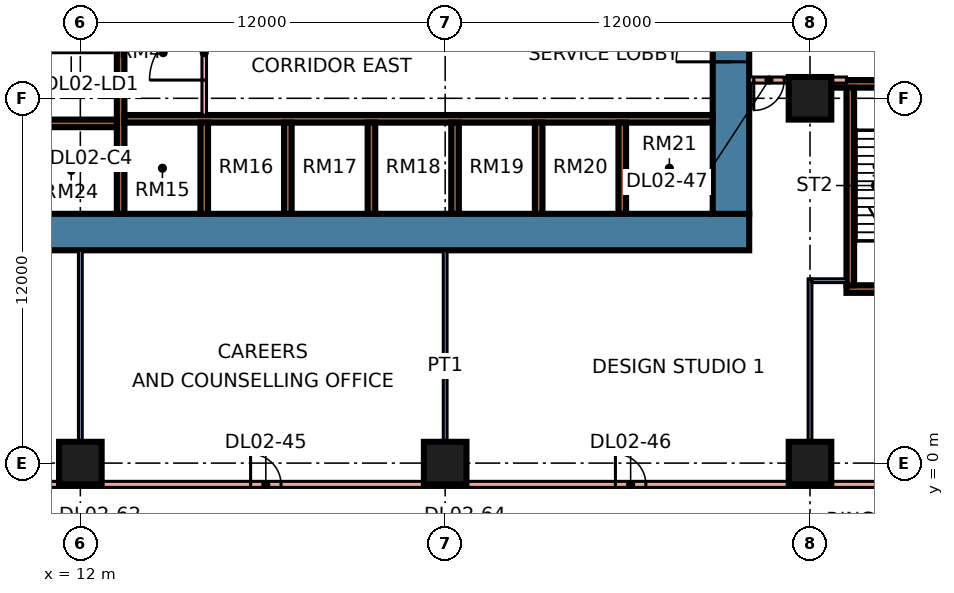
"""IFC4 building model, lengths in metres.
Left out: names, types, materials, properties, quantities, classifications, styles, units other than length and angle.
Written with IfcOpenShell. Run it as: python <this file> out.ifc"""

import sys

from ifc_helpers import new_model, si_unit, direction, frame, frame_2d, origin, origin_2d, place, context, subcontext, project, spatial, rectangle, extrude, element, fill, save


model = new_model("IFC4")
c1 = context("Model", 3, precision=1e-05, world=origin(), true_north=direction((0.0, 1.0)))
c2 = subcontext(c1, "Body", "Model", "MODEL_VIEW")
j1 = project(units=[si_unit("LENGTHUNIT", "METRE"), si_unit("PLANEANGLEUNIT", "RADIAN")], contexts=[c1])
p1 = place(None, origin())
s1 = spatial("IfcSite", under=j1, at=p1, CompositionType="ELEMENT")
p2 = place(p1, origin())
s2 = spatial("IfcBuilding", under=s1, at=p2, CompositionType="ELEMENT")
p3 = place(p2, frame((0.0, 0.0, 12.0)))
s3 = spatial("IfcBuildingStorey", under=s2, at=p3, CompositionType="ELEMENT", Elevation=12.0)
for number, where, z_axis, x_axis in (
    (1, (12.0, 0.0, 0.0), (0.0, 0.0, 1.0), (1.0, 0.0, 0.0)),
    (2, (24.0, 0.0, 0.0), (0.0, 0.0, 1.0), (1.0, 0.0, 0.0)),
    (3, (36.0, 0.0, 0.0), (0.0, 0.0, 1.0), (1.0, 0.0, 0.0)),
    (4, (36.0, 12.0, 0.0), (0.0, 0.0, 1.0), (1.0, 0.0, 0.0)),
):
    element("IfcColumn", number, at=place(p3, frame(where, z_axis=z_axis, x_axis=x_axis)), inside=s3, PredefinedType="COLUMN", context=c2, shape_type="SweptSolid", body=[
        extrude(rectangle(XDim=1.4, YDim=1.4, at=origin_2d()), origin(), (0.0, 0.0, 1.0), 4.8),
    ])
p4 = place(p3, frame((9.0, 7.6, 0.0), z_axis=(0.0, 0.0, 1.0), x_axis=(1.0, 0.0, 0.0)))
e5 = element("IfcWall", 5, at=p4, inside=s3, PredefinedType="SHEAR", context=c2, shape_type="SweptSolid", body=[
    extrude(rectangle(XDim=25.0, YDim=1.2, at=frame_2d((12.5, 0.0))), origin(), (0.0, 0.0, 1.0), 4.8),
])
p5 = place(p3, frame((33.4, 8.2, 0.0), z_axis=(0.0, 0.0, 1.0), x_axis=(0.0, 1.0, 0.0)))
e6 = element("IfcWall", 6, at=p5, inside=s3, PredefinedType="SHEAR", context=c2, shape_type="SweptSolid", body=[
    extrude(rectangle(XDim=10.6, YDim=1.2, at=frame_2d((5.3, 0.0))), origin(), (0.0, 0.0, 1.0), 4.8),
])
p6 = place(p5, frame((5.0, 0.0, 0.0)))
e7 = element("IfcOpeningElement", 7, at=p6, cuts=e6, PredefinedType="OPENING", context=c2, shape_type="SweptSolid", body=[
    extrude(rectangle(XDim=1.8, YDim=2.4, at=frame_2d((0.9, 1.2))), frame((0.0, 0.61, 0.0), z_axis=(0.0, -1.0, 0.0), x_axis=(1.0, 0.0, 0.0)), (0.0, 0.0, 1.0), 1.22),
])
p7 = place(p3, frame((13.325, 8.2, 0.0), z_axis=(0.0, 0.0, 1.0), x_axis=(0.0, 1.0, 0.0)))
e8 = element("IfcWall", 8, at=p7, inside=s3, PredefinedType="SHEAR", context=c2, shape_type="SweptSolid", body=[
    extrude(rectangle(XDim=10.6, YDim=0.25, at=frame_2d((5.3, 0.0))), origin(), (0.0, 0.0, 1.0), 4.8),
])
p8 = place(p3, frame((13.45, 11.325, 0.0), z_axis=(0.0, 0.0, 1.0), x_axis=(1.0, 0.0, 0.0)))
e9 = element("IfcWall", 9, at=p8, inside=s3, PredefinedType="SHEAR", context=c2, shape_type="SweptSolid", body=[
    extrude(rectangle(XDim=19.35, YDim=0.25, at=frame_2d((9.675, 0.0))), origin(), (0.0, 0.0, 1.0), 4.8),
])
for number, where, z_axis, x_axis in (
    (10, (10.2, 11.175, 0.0), (0.0, 0.0, 1.0), (1.0, 0.0, 0.0)),
    (11, (16.075, 8.2, 0.0), (0.0, 0.0, 1.0), (0.0, 1.0, 0.0)),
    (12, (18.825, 8.2, 0.0), (0.0, 0.0, 1.0), (0.0, 1.0, 0.0)),
    (13, (21.575, 8.2, 0.0), (0.0, 0.0, 1.0), (0.0, 1.0, 0.0)),
    (14, (24.325, 8.2, 0.0), (0.0, 0.0, 1.0), (0.0, 1.0, 0.0)),
    (15, (27.075, 8.2, 0.0), (0.0, 0.0, 1.0), (0.0, 1.0, 0.0)),
    (16, (29.825, 8.2, 0.0), (0.0, 0.0, 1.0), (0.0, 1.0, 0.0)),
):
    element("IfcWall", number, at=place(p3, frame(where, z_axis=z_axis, x_axis=x_axis)), inside=s3, PredefinedType="SHEAR", context=c2, shape_type="SweptSolid", body=[
        extrude(rectangle(XDim=3.0, YDim=0.25, at=frame_2d((1.5, 0.0))), origin(), (0.0, 0.0, 1.0), 4.8),
    ])
p9 = place(p3, frame((37.2, 5.725, 0.0), z_axis=(0.0, 0.0, 1.0), x_axis=(1.0, 0.0, 0.0)))
e17 = element("IfcWall", 17, at=p9, inside=s3, PredefinedType="SHEAR", context=c2, shape_type="SweptSolid", body=[
    extrude(rectangle(XDim=3.45, YDim=0.25, at=frame_2d((1.725, 0.0))), origin(), (0.0, 0.0, 1.0), 4.8),
])
p10 = place(p3, frame((36.7, 12.475, 0.0), z_axis=(0.0, 0.0, 1.0), x_axis=(1.0, 0.0, 0.0)))
e18 = element("IfcWall", 18, at=p10, inside=s3, PredefinedType="SHEAR", context=c2, shape_type="SweptSolid", body=[
    extrude(rectangle(XDim=3.95, YDim=0.25, at=frame_2d((1.975, 0.0))), origin(), (0.0, 0.0, 1.0), 4.8),
])
p11 = place(p10, frame((1.675, 0.0, 0.0)))
e19 = element("IfcOpeningElement", 19, at=p11, cuts=e18, PredefinedType="OPENING", context=c2, shape_type="SweptSolid", body=[
    extrude(rectangle(XDim=1.1, YDim=2.2, at=frame_2d((0.55, 1.1))), frame((0.0, 0.135, 0.0), z_axis=(0.0, -1.0, 0.0), x_axis=(1.0, 0.0, 0.0)), (0.0, 0.0, 1.0), 0.27),
])
p12 = place(p3, frame((37.325, 5.85, 0.0), z_axis=(0.0, 0.0, 1.0), x_axis=(0.0, 1.0, 0.0)))
e20 = element("IfcWall", 20, at=p12, inside=s3, PredefinedType="SHEAR", context=c2, shape_type="SweptSolid", body=[
    extrude(rectangle(XDim=6.5, YDim=0.25, at=frame_2d((3.25, 0.0))), origin(), (0.0, 0.0, 1.0), 4.8),
])
p13 = place(p3, frame((16.075, 11.45, 0.0), z_axis=(0.0, 0.0, 1.0), x_axis=(0.0, 1.0, 0.0)))
e21 = element("IfcWall", 21, at=p13, inside=s3, PredefinedType="PARTITIONING", context=c2, shape_type="SweptSolid", body=[
    extrude(rectangle(XDim=4.1, YDim=0.15, at=frame_2d((2.05, 0.0))), origin(), (0.0, 0.0, 1.0), 4.4),
])
p14 = place(p13, frame((1.15, 0.0, 0.0)))
e22 = element("IfcOpeningElement", 22, at=p14, cuts=e21, PredefinedType="OPENING", context=c2, shape_type="SweptSolid", body=[
    extrude(rectangle(XDim=1.8, YDim=2.4, at=frame_2d((0.9, 1.2))), frame((0.0, 0.085, 0.0), z_axis=(0.0, -1.0, 0.0), x_axis=(1.0, 0.0, 0.0)), (0.0, 0.0, 1.0), 0.17),
])
p15 = place(p3, frame((0.7, -0.7, 0.0), z_axis=(0.0, 0.0, 1.0), x_axis=(1.0, 0.0, 0.0)))
e23 = element("IfcWall", 23, at=p15, inside=s3, PredefinedType="PARTITIONING", context=c2, shape_type="SweptSolid", body=[
    extrude(rectangle(XDim=44.3, YDim=0.2, at=frame_2d((22.15, 0.0))), origin(), (0.0, 0.0, 1.0), 4.4),
])
p16 = place(p15, frame((39.4, 0.0, 0.0)))
e24 = element("IfcOpeningElement", 24, at=p16, cuts=e23, PredefinedType="OPENING", context=c2, shape_type="SweptSolid", body=[
    extrude(rectangle(XDim=1.0, YDim=2.1, at=frame_2d((0.5, 1.05))), frame((0.0, 0.11, 0.0), z_axis=(0.0, -1.0, 0.0), x_axis=(1.0, 0.0, 0.0)), (0.0, 0.0, 1.0), 0.22),
])
p17 = place(p15, frame((5.4, 0.0, 0.0)))
e25 = element("IfcOpeningElement", 25, at=p17, cuts=e23, PredefinedType="OPENING", context=c2, shape_type="SweptSolid", body=[
    extrude(rectangle(XDim=1.0, YDim=2.1, at=frame_2d((0.5, 1.05))), frame((0.0, 0.11, 0.0), z_axis=(0.0, -1.0, 0.0), x_axis=(1.0, 0.0, 0.0)), (0.0, 0.0, 1.0), 0.22),
])
p18 = place(p15, frame((16.9, 0.0, 0.0)))
e26 = element("IfcOpeningElement", 26, at=p18, cuts=e23, PredefinedType="OPENING", context=c2, shape_type="SweptSolid", body=[
    extrude(rectangle(XDim=1.0, YDim=2.1, at=frame_2d((0.5, 1.05))), frame((0.0, 0.11, 0.0), z_axis=(0.0, -1.0, 0.0), x_axis=(1.0, 0.0, 0.0)), (0.0, 0.0, 1.0), 0.22),
])
p19 = place(p15, frame((28.9, 0.0, 0.0)))
e27 = element("IfcOpeningElement", 27, at=p19, cuts=e23, PredefinedType="OPENING", context=c2, shape_type="SweptSolid", body=[
    extrude(rectangle(XDim=1.0, YDim=2.1, at=frame_2d((0.5, 1.05))), frame((0.0, 0.11, 0.0), z_axis=(0.0, -1.0, 0.0), x_axis=(1.0, 0.0, 0.0)), (0.0, 0.0, 1.0), 0.22),
])
for number, where, z_axis, x_axis in (
    (28, (12.0, -0.6, 0.0), (0.0, 0.0, 1.0), (0.0, 1.0, 0.0)),
    (29, (24.0, -0.6, 0.0), (0.0, 0.0, 1.0), (0.0, 1.0, 0.0)),
):
    element("IfcWall", number, at=place(p3, frame(where, z_axis=z_axis, x_axis=x_axis)), inside=s3, PredefinedType="PARTITIONING", context=c2, shape_type="SweptSolid", body=[
        extrude(rectangle(XDim=7.6, YDim=0.125, at=frame_2d((3.8, 0.0))), origin(), (0.0, 0.0, 1.0), 4.4),
    ])
p20 = place(p3, frame((34.0, 12.6, 0.0), z_axis=(0.0, 0.0, 1.0), x_axis=(1.0, 0.0, 0.0)))
e30 = element("IfcWall", 30, at=p20, inside=s3, PredefinedType="PARTITIONING", context=c2, shape_type="SweptSolid", body=[
    extrude(rectangle(XDim=3.2, YDim=0.2, at=frame_2d((1.6, 0.0))), origin(), (0.0, 0.0, 1.0), 4.4),
])
p21 = place(p20, frame((0.15, 0.0, 0.0)))
e31 = element("IfcOpeningElement", 31, at=p21, cuts=e30, PredefinedType="OPENING", context=c2, shape_type="SweptSolid", body=[
    extrude(rectangle(XDim=1.0, YDim=2.1, at=frame_2d((0.5, 1.05))), frame((0.0, 0.11, 0.0), z_axis=(0.0, -1.0, 0.0), x_axis=(1.0, 0.0, 0.0)), (0.0, 0.0, 1.0), 0.22),
])
p22 = place(p3, frame((36.0, -0.6, 0.0), z_axis=(0.0, 0.0, 1.0), x_axis=(0.0, 1.0, 0.0)))
e32 = element("IfcWall", 32, at=p22, inside=s3, PredefinedType="PARTITIONING", context=c2, shape_type="SweptSolid", body=[
    extrude(rectangle(XDim=6.662, YDim=0.125, at=frame_2d((3.331, 0.0))), origin(), (0.0, 0.0, 1.0), 4.4),
])
p23 = place(p3, frame((36.062, 6.0, 0.0), z_axis=(0.0, 0.0, 1.0), x_axis=(1.0, 0.0, 0.0)))
e33 = element("IfcWall", 33, at=p23, inside=s3, PredefinedType="PARTITIONING", context=c2, shape_type="SweptSolid", body=[
    extrude(rectangle(XDim=1.138, YDim=0.125, at=frame_2d((0.569, 0.0))), origin(), (0.0, 0.0, 1.0), 4.4),
])
p24 = place(p6, origin())
e34 = element("IfcDoor", 34, at=p24, inside=s3, OperationType="DOUBLE_DOOR_SINGLE_SWING", PredefinedType="DOOR", context=c2, shape_type="SweptSolid", body=[
    extrude(rectangle(XDim=1.8, YDim=2.4, at=frame_2d((0.9, 1.2))), frame((0.0, 0.025, 0.0), z_axis=(0.0, -1.0, 0.0), x_axis=(1.0, 0.0, 0.0)), (0.0, 0.0, 1.0), 0.05),
])
fill(e7, e34)
p25 = place(p14, origin())
e35 = element("IfcDoor", 35, at=p25, inside=s3, OperationType="DOUBLE_DOOR_SINGLE_SWING", PredefinedType="DOOR", context=c2, shape_type="SweptSolid", body=[
    extrude(rectangle(XDim=1.8, YDim=2.4, at=frame_2d((0.9, 1.2))), frame((0.0, 0.025, 0.0), z_axis=(0.0, -1.0, 0.0), x_axis=(1.0, 0.0, 0.0)), (0.0, 0.0, 1.0), 0.05),
])
fill(e22, e35)
p26 = place(p18, origin())
e36 = element("IfcDoor", 36, at=p26, inside=s3, OperationType="SINGLE_SWING_LEFT", PredefinedType="DOOR", context=c2, shape_type="SweptSolid", body=[
    extrude(rectangle(XDim=1.0, YDim=2.1, at=frame_2d((0.5, 1.05))), frame((0.0, 0.025, 0.0), z_axis=(0.0, -1.0, 0.0), x_axis=(1.0, 0.0, 0.0)), (0.0, 0.0, 1.0), 0.05),
])
fill(e26, e36)
p27 = place(p19, origin())
e37 = element("IfcDoor", 37, at=p27, inside=s3, OperationType="SINGLE_SWING_LEFT", PredefinedType="DOOR", context=c2, shape_type="SweptSolid", body=[
    extrude(rectangle(XDim=1.0, YDim=2.1, at=frame_2d((0.5, 1.05))), frame((0.0, 0.025, 0.0), z_axis=(0.0, -1.0, 0.0), x_axis=(1.0, 0.0, 0.0)), (0.0, 0.0, 1.0), 0.05),
])
fill(e27, e37)
p28 = place(p21, frame((1.0, 0.0, 0.0), z_axis=(0.0, 0.0, 1.0), x_axis=(-1.0, 0.0, 0.0)))
e38 = element("IfcDoor", 38, at=p28, inside=s3, OperationType="SINGLE_SWING_LEFT", PredefinedType="DOOR", context=c2, shape_type="SweptSolid", body=[
    extrude(rectangle(XDim=1.0, YDim=2.1, at=frame_2d((0.5, 1.05))), frame((0.0, 0.025, 0.0), z_axis=(0.0, -1.0, 0.0), x_axis=(1.0, 0.0, 0.0)), (0.0, 0.0, 1.0), 0.05),
])
fill(e31, e38)
save(model, sys.argv[1])
